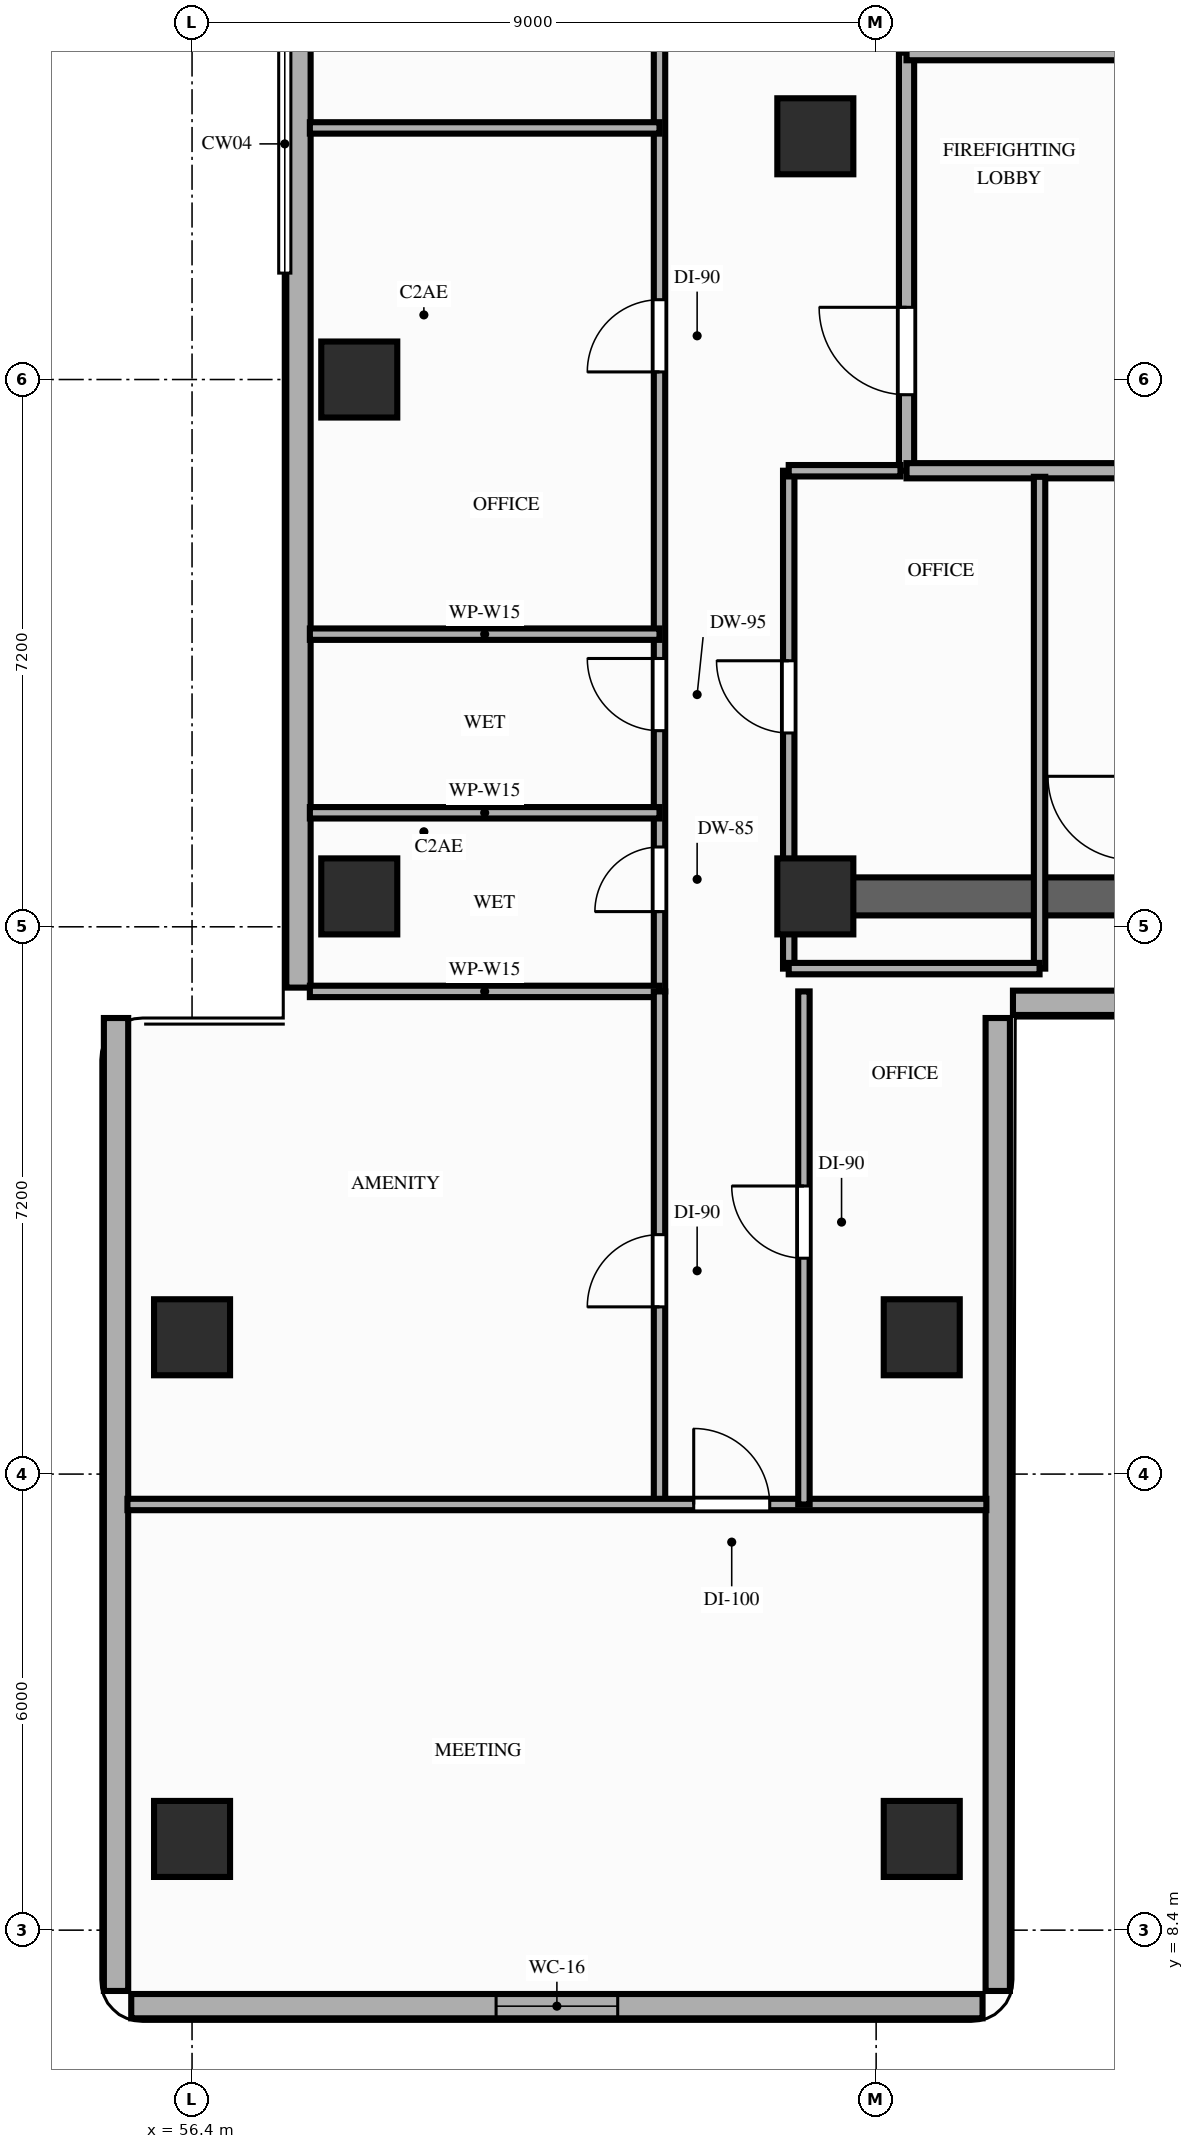
"""IFC4 building model, lengths in metres.
Left out: names, types, materials, properties, quantities, classifications, styles, units other than length and angle.
Written with IfcOpenShell. Run it as: python <this file> out.ifc"""

import sys

from ifc_helpers import new_model, si_unit, direction, frame, frame_2d, origin, origin_2d, place, context, subcontext, project, spatial, rectangle, extrude, element, fill, save


model = new_model("IFC4")
c1 = context("Model", 3, precision=1e-05, world=origin(), true_north=direction((0.0, 1.0)))
c2 = subcontext(c1, "Body", "Model", "MODEL_VIEW")
j1 = project(units=[si_unit("LENGTHUNIT", "METRE"), si_unit("PLANEANGLEUNIT", "RADIAN")], contexts=[c1])
p1 = place(None, origin())
s1 = spatial("IfcSite", under=j1, at=p1, CompositionType="ELEMENT")
p2 = place(p1, origin())
s2 = spatial("IfcBuilding", under=s1, at=p2, CompositionType="ELEMENT")
p3 = place(p2, frame((0.0, 0.0, 46.8)))
s3 = spatial("IfcBuildingStorey", under=s2, at=p3, CompositionType="ELEMENT", Elevation=46.8)
for number, where, z_axis, x_axis in (
    (1, (64.6, 22.0, 0.0), (0.0, 0.0, 1.0), (1.0, 0.0, 0.0)),
    (2, (64.6, 32.0, 0.0), (0.0, 0.0, 1.0), (1.0, 0.0, 0.0)),
    (3, (58.6, 22.0, 0.0), (0.0, 0.0, 1.0), (1.0, 0.0, 0.0)),
    (4, (58.6, 28.8, 0.0), (0.0, 0.0, 1.0), (1.0, 0.0, 0.0)),
    (5, (56.4, 9.6, 0.0), (0.0, 0.0, 1.0), (1.0, 0.0, 0.0)),
    (6, (56.4, 16.2, 0.0), (0.0, 0.0, 1.0), (1.0, 0.0, 0.0)),
    (7, (66.0, 9.6, 0.0), (0.0, 0.0, 1.0), (1.0, 0.0, 0.0)),
    (8, (66.0, 16.2, 0.0), (0.0, 0.0, 1.0), (1.0, 0.0, 0.0)),
):
    element("IfcColumn", number, at=place(p3, frame(where, z_axis=z_axis, x_axis=x_axis)), inside=s3, PredefinedType="COLUMN", context=c2, shape_type="SweptSolid", body=[
        extrude(rectangle(XDim=1.0, YDim=1.0, at=origin_2d()), origin(), (0.0, 0.0, 1.0), 3.2),
    ])
p4 = place(p3, frame((57.8, 43.4, 0.0), z_axis=(0.0, 0.0, 1.0), x_axis=(0.0, -1.0, 0.0)))
e9 = element("IfcWall", 9, at=p4, inside=s3, PredefinedType="STANDARD", context=c2, shape_type="SweptSolid", body=[
    extrude(rectangle(XDim=22.6, YDim=0.32, at=frame_2d((11.3, 0.0))), origin(), (0.0, 0.0, 1.0), 2.5),
])
p5 = place(p4, frame((3.6, 0.0, 0.85)))
e10 = element("IfcOpeningElement", 10, at=p5, cuts=e9, PredefinedType="OPENING", context=c2, shape_type="SweptSolid", body=[
    extrude(rectangle(XDim=1.6, YDim=1.35, at=frame_2d((0.8, 0.675))), frame((0.0, 0.17, 0.0), z_axis=(0.0, -1.0, 0.0), x_axis=(1.0, 0.0, 0.0)), (0.0, 0.0, 1.0), 0.34),
])
p6 = place(p3, frame((55.6, 7.4, 0.0), z_axis=(0.0, 0.0, 1.0), x_axis=(1.0, 0.0, 0.0)))
e11 = element("IfcWall", 11, at=p6, inside=s3, PredefinedType="STANDARD", context=c2, shape_type="SweptSolid", body=[
    extrude(rectangle(XDim=11.2, YDim=0.32, at=frame_2d((5.6, 0.0))), origin(), (0.0, 0.0, 1.0), 3.02),
])
p7 = place(p6, frame((4.8, 0.0, 0.85)))
e12 = element("IfcOpeningElement", 12, at=p7, cuts=e11, PredefinedType="OPENING", context=c2, shape_type="SweptSolid", body=[
    extrude(rectangle(XDim=1.6, YDim=1.7, at=frame_2d((0.8, 0.85))), frame((0.0, 0.17, 0.0), z_axis=(0.0, -1.0, 0.0), x_axis=(1.0, 0.0, 0.0)), (0.0, 0.0, 1.0), 0.34),
])
for number, where, z_axis, x_axis in (
    (13, (55.4, 20.4, 0.0), (0.0, 0.0, 1.0), (0.0, -1.0, 0.0)),
    (14, (67.0, 7.6, 0.0), (0.0, 0.0, 1.0), (0.0, 1.0, 0.0)),
):
    element("IfcWall", number, at=place(p3, frame(where, z_axis=z_axis, x_axis=x_axis)), inside=s3, PredefinedType="STANDARD", context=c2, shape_type="SweptSolid", body=[
        extrude(rectangle(XDim=12.8, YDim=0.32, at=frame_2d((6.4, 0.0))), origin(), (0.0, 0.0, 1.0), 3.02),
    ])
p8 = place(p3, frame((67.2, 20.6, 0.0), z_axis=(0.0, 0.0, 1.0), x_axis=(1.0, 0.0, 0.0)))
e15 = element("IfcWall", 15, at=p8, inside=s3, PredefinedType="STANDARD", context=c2, shape_type="SweptSolid", body=[
    extrude(rectangle(XDim=5.6, YDim=0.32, at=frame_2d((2.8, 0.0))), origin(), (0.0, 0.0, 1.0), 3.02),
])
p9 = place(p3, frame((64.6, 22.0, 0.0), z_axis=(0.0, 0.0, 1.0), x_axis=(1.0, 0.0, 0.0)))
e16 = element("IfcWall", 16, at=p9, inside=s3, PredefinedType="SHEAR", context=c2, shape_type="SweptSolid", body=[
    extrude(rectangle(XDim=7.5, YDim=0.5, at=frame_2d((3.75, 0.0))), origin(), (0.0, 0.0, 1.0), 3.02),
])
p10 = place(p3, frame((65.8, 27.6, 0.0), z_axis=(0.0, 0.0, 1.0), x_axis=(0.0, 1.0, 0.0)))
e17 = element("IfcWall", 17, at=p10, inside=s3, PredefinedType="PARTITIONING", context=c2, shape_type="SweptSolid", body=[
    extrude(rectangle(XDim=5.5, YDim=0.2, at=frame_2d((2.75, 0.0))), origin(), (0.0, 0.0, 1.0), 3.02),
])
p11 = place(p10, frame((1.0, 0.0, 0.0)))
e18 = element("IfcOpeningElement", 18, at=p11, cuts=e17, PredefinedType="OPENING", context=c2, shape_type="SweptSolid", body=[
    extrude(rectangle(XDim=1.15, YDim=2.15, at=frame_2d((0.575, 1.075))), frame((0.0, 0.11, 0.0), z_axis=(0.0, -1.0, 0.0), x_axis=(1.0, 0.0, 0.0)), (0.0, 0.0, 1.0), 0.22),
])
p12 = place(p3, frame((65.8, 33.1, 0.0), z_axis=(0.0, 0.0, 1.0), x_axis=(1.0, 0.0, 0.0)))
e19 = element("IfcWall", 19, at=p12, inside=s3, PredefinedType="PARTITIONING", context=c2, shape_type="SweptSolid", body=[
    extrude(rectangle(XDim=3.6, YDim=0.2, at=frame_2d((1.8, 0.0))), origin(), (0.0, 0.0, 1.0), 3.02),
])
p13 = place(p3, frame((65.8, 27.6, 0.0), z_axis=(0.0, 0.0, 1.0), x_axis=(1.0, 0.0, 0.0)))
e20 = element("IfcWall", 20, at=p13, inside=s3, PredefinedType="PARTITIONING", context=c2, shape_type="SweptSolid", body=[
    extrude(rectangle(XDim=3.4, YDim=0.2, at=frame_2d((1.7, 0.0))), origin(), (0.0, 0.0, 1.0), 3.02),
])
p14 = place(p3, frame((64.25, 21.05, 0.0), z_axis=(0.0, 0.0, 1.0), x_axis=(0.0, 1.0, 0.0)))
e21 = element("IfcWall", 21, at=p14, inside=s3, PredefinedType="PARTITIONING", context=c2, shape_type="SweptSolid", body=[
    extrude(rectangle(XDim=6.55, YDim=0.15, at=frame_2d((3.275, 0.0))), origin(), (0.0, 0.0, 1.0), 2.5),
])
p15 = place(p14, frame((3.1, 0.0, 0.0)))
e22 = element("IfcOpeningElement", 22, at=p15, cuts=e21, PredefinedType="OPENING", context=c2, shape_type="SweptSolid", body=[
    extrude(rectangle(XDim=0.95, YDim=2.15, at=frame_2d((0.475, 1.075))), frame((0.0, 0.085, 0.0), z_axis=(0.0, -1.0, 0.0), x_axis=(1.0, 0.0, 0.0)), (0.0, 0.0, 1.0), 0.17),
])
p16 = place(p3, frame((67.55, 21.05, 0.0), z_axis=(0.0, 0.0, 1.0), x_axis=(0.0, 1.0, 0.0)))
e23 = element("IfcWall", 23, at=p16, inside=s3, PredefinedType="PARTITIONING", context=c2, shape_type="SweptSolid", body=[
    extrude(rectangle(XDim=6.47, YDim=0.15, at=frame_2d((3.235, 0.0))), origin(), (0.0, 0.0, 1.0), 2.5),
])
p17 = place(p3, frame((64.25, 21.05, 0.0), z_axis=(0.0, 0.0, 1.0), x_axis=(1.0, 0.0, 0.0)))
e24 = element("IfcWall", 24, at=p17, inside=s3, PredefinedType="PARTITIONING", context=c2, shape_type="SweptSolid", body=[
    extrude(rectangle(XDim=3.3, YDim=0.15, at=frame_2d((1.65, 0.0))), origin(), (0.0, 0.0, 1.0), 2.5),
])
p18 = place(p3, frame((64.25, 27.6, 0.0), z_axis=(0.0, 0.0, 1.0), x_axis=(1.0, 0.0, 0.0)))
e25 = element("IfcWall", 25, at=p18, inside=s3, PredefinedType="PARTITIONING", context=c2, shape_type="SweptSolid", body=[
    extrude(rectangle(XDim=1.47, YDim=0.15, at=frame_2d((0.735, 0.0))), origin(), (0.0, 0.0, 1.0), 2.5),
])
p19 = place(p3, frame((62.55, 20.75, 0.0), z_axis=(0.0, 0.0, 1.0), x_axis=(0.0, 1.0, 0.0)))
e26 = element("IfcWall", 26, at=p19, inside=s3, PredefinedType="PARTITIONING", context=c2, shape_type="SweptSolid", body=[
    extrude(rectangle(XDim=22.7, YDim=0.15, at=frame_2d((11.35, 0.0))), origin(), (0.0, 0.0, 1.0), 2.5),
])
p20 = place(p19, frame((1.05, 0.0, 0.0)))
e27 = element("IfcOpeningElement", 27, at=p20, cuts=e26, PredefinedType="OPENING", context=c2, shape_type="SweptSolid", body=[
    extrude(rectangle(XDim=0.85, YDim=2.1, at=frame_2d((0.425, 1.05))), frame((0.0, 0.085, 0.0), z_axis=(0.0, -1.0, 0.0), x_axis=(1.0, 0.0, 0.0)), (0.0, 0.0, 1.0), 0.17),
])
p21 = place(p19, frame((3.43, 0.0, 0.0)))
e28 = element("IfcOpeningElement", 28, at=p21, cuts=e26, PredefinedType="OPENING", context=c2, shape_type="SweptSolid", body=[
    extrude(rectangle(XDim=0.95, YDim=2.1, at=frame_2d((0.475, 1.05))), frame((0.0, 0.085, 0.0), z_axis=(0.0, -1.0, 0.0), x_axis=(1.0, 0.0, 0.0)), (0.0, 0.0, 1.0), 0.17),
])
p22 = place(p19, frame((8.15, 0.0, 0.0)))
e29 = element("IfcOpeningElement", 29, at=p22, cuts=e26, PredefinedType="OPENING", context=c2, shape_type="SweptSolid", body=[
    extrude(rectangle(XDim=0.95, YDim=2.15, at=frame_2d((0.475, 1.075))), frame((0.0, 0.085, 0.0), z_axis=(0.0, -1.0, 0.0), x_axis=(1.0, 0.0, 0.0)), (0.0, 0.0, 1.0), 0.17),
])
p23 = place(p19, frame((16.55, 0.0, 0.0)))
e30 = element("IfcOpeningElement", 30, at=p23, cuts=e26, PredefinedType="OPENING", context=c2, shape_type="SweptSolid", body=[
    extrude(rectangle(XDim=0.95, YDim=2.15, at=frame_2d((0.475, 1.075))), frame((0.0, 0.085, 0.0), z_axis=(0.0, -1.0, 0.0), x_axis=(1.0, 0.0, 0.0)), (0.0, 0.0, 1.0), 0.17),
])
for number, where, z_axis, x_axis in (
    (31, (57.95, 20.75, 0.0), (0.0, 0.0, 1.0), (1.0, 0.0, 0.0)),
    (32, (57.95, 23.1, 0.0), (0.0, 0.0, 1.0), (1.0, 0.0, 0.0)),
    (33, (57.95, 25.45, 0.0), (0.0, 0.0, 1.0), (1.0, 0.0, 0.0)),
    (34, (57.95, 32.11, 0.0), (0.0, 0.0, 1.0), (1.0, 0.0, 0.0)),
):
    element("IfcWall", number, at=place(p3, frame(where, z_axis=z_axis, x_axis=x_axis)), inside=s3, PredefinedType="PARTITIONING", context=c2, shape_type="SweptSolid", body=[
        extrude(rectangle(XDim=4.6, YDim=0.15, at=frame_2d((2.3, 0.0))), origin(), (0.0, 0.0, 1.0), 2.5),
    ])
p24 = place(p3, frame((62.55, 14.0, 0.0), z_axis=(0.0, 0.0, 1.0), x_axis=(0.0, 1.0, 0.0)))
e35 = element("IfcWall", 35, at=p24, inside=s3, PredefinedType="PARTITIONING", context=c2, shape_type="SweptSolid", body=[
    extrude(rectangle(XDim=6.75, YDim=0.15, at=frame_2d((3.375, 0.0))), origin(), (0.0, 0.0, 1.0), 2.5),
])
p25 = place(p24, frame((2.6, 0.0, 0.0)))
e36 = element("IfcOpeningElement", 36, at=p25, cuts=e35, PredefinedType="OPENING", context=c2, shape_type="SweptSolid", body=[
    extrude(rectangle(XDim=0.95, YDim=2.15, at=frame_2d((0.475, 1.075))), frame((0.0, 0.085, 0.0), z_axis=(0.0, -1.0, 0.0), x_axis=(1.0, 0.0, 0.0)), (0.0, 0.0, 1.0), 0.17),
])
p26 = place(p3, frame((55.55, 14.0, 0.0), z_axis=(0.0, 0.0, 1.0), x_axis=(1.0, 0.0, 0.0)))
e37 = element("IfcWall", 37, at=p26, inside=s3, PredefinedType="PARTITIONING", context=c2, shape_type="SweptSolid", body=[
    extrude(rectangle(XDim=11.3, YDim=0.15, at=frame_2d((5.65, 0.0))), origin(), (0.0, 0.0, 1.0), 2.5),
])
p27 = place(p26, frame((7.45, 0.0, 0.0)))
e38 = element("IfcOpeningElement", 38, at=p27, cuts=e37, PredefinedType="OPENING", context=c2, shape_type="SweptSolid", body=[
    extrude(rectangle(XDim=1.0, YDim=2.15, at=frame_2d((0.5, 1.075))), frame((0.0, 0.085, 0.0), z_axis=(0.0, -1.0, 0.0), x_axis=(1.0, 0.0, 0.0)), (0.0, 0.0, 1.0), 0.17),
])
p28 = place(p3, frame((64.45, 14.0, 0.0), z_axis=(0.0, 0.0, 1.0), x_axis=(0.0, 1.0, 0.0)))
e39 = element("IfcWall", 39, at=p28, inside=s3, PredefinedType="PARTITIONING", context=c2, shape_type="SweptSolid", body=[
    extrude(rectangle(XDim=6.75, YDim=0.15, at=frame_2d((3.375, 0.0))), origin(), (0.0, 0.0, 1.0), 2.5),
])
p29 = place(p28, frame((3.24, 0.0, 0.0)))
e40 = element("IfcOpeningElement", 40, at=p29, cuts=e39, PredefinedType="OPENING", context=c2, shape_type="SweptSolid", body=[
    extrude(rectangle(XDim=0.95, YDim=2.15, at=frame_2d((0.475, 1.075))), frame((0.0, 0.085, 0.0), z_axis=(0.0, -1.0, 0.0), x_axis=(1.0, 0.0, 0.0)), (0.0, 0.0, 1.0), 0.17),
])
p30 = place(p7, origin())
e41 = element("IfcWindow", 41, at=p30, inside=s3, PartitioningType="SINGLE_PANEL", PredefinedType="WINDOW", context=c2, shape_type="SweptSolid", body=[
    extrude(rectangle(XDim=1.6, YDim=1.7, at=frame_2d((0.8, 0.85))), frame((0.0, 0.03, 0.0), z_axis=(0.0, -1.0, 0.0), x_axis=(1.0, 0.0, 0.0)), (0.0, 0.0, 1.0), 0.06),
])
fill(e12, e41)
p31 = place(p11, origin())
e42 = element("IfcDoor", 42, at=p31, inside=s3, OperationType="SINGLE_SWING_RIGHT", PredefinedType="DOOR", context=c2, shape_type="SweptSolid", body=[
    extrude(rectangle(XDim=1.15, YDim=2.15, at=frame_2d((0.575, 1.075))), frame((0.0, 0.025, 0.0), z_axis=(0.0, -1.0, 0.0), x_axis=(1.0, 0.0, 0.0)), (0.0, 0.0, 1.0), 0.05),
])
fill(e18, e42)
p32 = place(p15, origin())
e43 = element("IfcDoor", 43, at=p32, inside=s3, OperationType="SINGLE_SWING_RIGHT", PredefinedType="DOOR", context=c2, shape_type="SweptSolid", body=[
    extrude(rectangle(XDim=0.95, YDim=2.15, at=frame_2d((0.475, 1.075))), frame((0.0, 0.025, 0.0), z_axis=(0.0, -1.0, 0.0), x_axis=(1.0, 0.0, 0.0)), (0.0, 0.0, 1.0), 0.05),
])
fill(e22, e43)
p33 = place(p20, origin())
e44 = element("IfcDoor", 44, at=p33, inside=s3, OperationType="SINGLE_SWING_LEFT", PredefinedType="DOOR", context=c2, shape_type="SweptSolid", body=[
    extrude(rectangle(XDim=0.85, YDim=2.1, at=frame_2d((0.425, 1.05))), frame((0.0, 0.025, 0.0), z_axis=(0.0, -1.0, 0.0), x_axis=(1.0, 0.0, 0.0)), (0.0, 0.0, 1.0), 0.05),
])
fill(e27, e44)
p34 = place(p21, origin())
e45 = element("IfcDoor", 45, at=p34, inside=s3, OperationType="SINGLE_SWING_RIGHT", PredefinedType="DOOR", context=c2, shape_type="SweptSolid", body=[
    extrude(rectangle(XDim=0.95, YDim=2.1, at=frame_2d((0.475, 1.05))), frame((0.0, 0.025, 0.0), z_axis=(0.0, -1.0, 0.0), x_axis=(1.0, 0.0, 0.0)), (0.0, 0.0, 1.0), 0.05),
])
fill(e28, e45)
p35 = place(p22, origin())
e46 = element("IfcDoor", 46, at=p35, inside=s3, OperationType="SINGLE_SWING_LEFT", PredefinedType="DOOR", context=c2, shape_type="SweptSolid", body=[
    extrude(rectangle(XDim=0.95, YDim=2.15, at=frame_2d((0.475, 1.075))), frame((0.0, 0.025, 0.0), z_axis=(0.0, -1.0, 0.0), x_axis=(1.0, 0.0, 0.0)), (0.0, 0.0, 1.0), 0.05),
])
fill(e29, e46)
p36 = place(p25, origin())
e47 = element("IfcDoor", 47, at=p36, inside=s3, OperationType="SINGLE_SWING_LEFT", PredefinedType="DOOR", context=c2, shape_type="SweptSolid", body=[
    extrude(rectangle(XDim=0.95, YDim=2.15, at=frame_2d((0.475, 1.075))), frame((0.0, 0.025, 0.0), z_axis=(0.0, -1.0, 0.0), x_axis=(1.0, 0.0, 0.0)), (0.0, 0.0, 1.0), 0.05),
])
fill(e36, e47)
p37 = place(p29, origin())
e48 = element("IfcDoor", 48, at=p37, inside=s3, OperationType="SINGLE_SWING_RIGHT", PredefinedType="DOOR", context=c2, shape_type="SweptSolid", body=[
    extrude(rectangle(XDim=0.95, YDim=2.15, at=frame_2d((0.475, 1.075))), frame((0.0, 0.025, 0.0), z_axis=(0.0, -1.0, 0.0), x_axis=(1.0, 0.0, 0.0)), (0.0, 0.0, 1.0), 0.05),
])
fill(e40, e48)
p38 = place(p27, origin())
e49 = element("IfcDoor", 49, at=p38, inside=s3, OperationType="SINGLE_SWING_LEFT", PredefinedType="DOOR", context=c2, shape_type="SweptSolid", body=[
    extrude(rectangle(XDim=1.0, YDim=2.15, at=frame_2d((0.5, 1.075))), frame((0.0, 0.025, 0.0), z_axis=(0.0, -1.0, 0.0), x_axis=(1.0, 0.0, 0.0)), (0.0, 0.0, 1.0), 0.05),
])
fill(e38, e49)
save(model, sys.argv[1])
